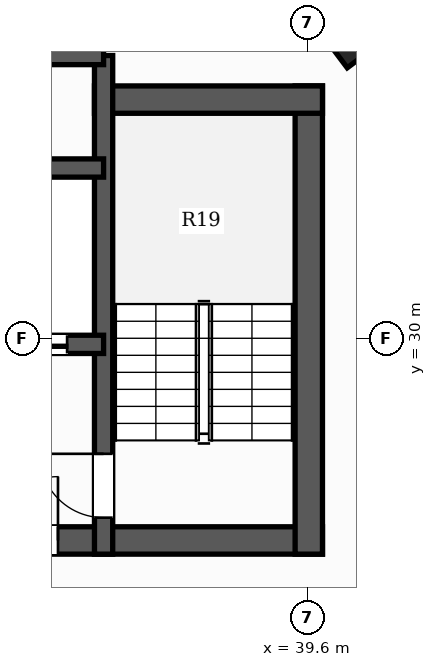
"""IFC4 building model, lengths in metres.
Left out: names, types, materials, properties, quantities, classifications, styles, units other than length and angle.
Written with IfcOpenShell. Run it as: python <this file> out.ifc"""

import sys

from ifc_helpers import new_model, si_unit, direction, frame, frame_2d, origin, origin_2d, place, context, subcontext, project, spatial, rectangle, hollow_rectangle, extrude, element, fill, save


model = new_model("IFC4")
c1 = context("Model", 3, precision=1e-05, world=origin(), true_north=direction((0.0, 1.0)))
c2 = subcontext(c1, "Body", "Model", "MODEL_VIEW")
j1 = project(units=[si_unit("LENGTHUNIT", "METRE"), si_unit("PLANEANGLEUNIT", "RADIAN")], contexts=[c1])
p1 = place(None, origin())
s1 = spatial("IfcSite", under=j1, at=p1, CompositionType="ELEMENT")
p2 = place(p1, origin())
s2 = spatial("IfcBuilding", under=s1, at=p2, CompositionType="ELEMENT")
p3 = place(p2, frame((0.0, 0.0, 23.6)))
s3 = spatial("IfcBuildingStorey", under=s2, at=p3, CompositionType="ELEMENT", Elevation=23.6)
p4 = place(p3, frame((26.15, 26.675, 0.0), z_axis=(0.0, 0.0, 1.0), x_axis=(1.0, 0.0, 0.0)))
e1 = element("IfcWall", 1, at=p4, inside=s3, PredefinedType="SHEAR", context=c2, shape_type="SweptSolid", body=[
    extrude(rectangle(XDim=13.7, YDim=0.45, at=frame_2d((6.85, 0.0))), origin(), (0.0, 0.0, 1.0), 3.3),
])
p5 = place(p4, frame((4.35, 0.0, 0.0)))
e2 = element("IfcOpeningElement", 2, at=p5, cuts=e1, PredefinedType="OPENING", context=c2, shape_type="SweptSolid", body=[
    extrude(rectangle(XDim=1.05, YDim=2.15, at=frame_2d((0.525, 1.075))), frame((0.0, 0.235, 0.0), z_axis=(0.0, -1.0, 0.0), x_axis=(1.0, 0.0, 0.0)), (0.0, 0.0, 1.0), 0.47),
])
p6 = place(p4, frame((8.3, 0.0, 0.0)))
e3 = element("IfcOpeningElement", 3, at=p6, cuts=e1, PredefinedType="OPENING", context=c2, shape_type="SweptSolid", body=[
    extrude(rectangle(XDim=1.05, YDim=2.15, at=frame_2d((0.525, 1.075))), frame((0.0, 0.235, 0.0), z_axis=(0.0, -1.0, 0.0), x_axis=(1.0, 0.0, 0.0)), (0.0, 0.0, 1.0), 0.47),
])
p7 = place(p3, frame((39.625, 26.45, 0.0), z_axis=(0.0, 0.0, 1.0), x_axis=(0.0, 1.0, 0.0)))
e4 = element("IfcWall", 4, at=p7, inside=s3, PredefinedType="SHEAR", context=c2, shape_type="SweptSolid", body=[
    extrude(rectangle(XDim=7.7, YDim=0.45, at=frame_2d((3.85, 0.0))), origin(), (0.0, 0.0, 1.0), 3.3),
])
p8 = place(p3, frame((36.1, 33.925, 0.0), z_axis=(0.0, 0.0, 1.0), x_axis=(1.0, 0.0, 0.0)))
e5 = element("IfcWall", 5, at=p8, inside=s3, PredefinedType="SHEAR", context=c2, shape_type="SweptSolid", body=[
    extrude(rectangle(XDim=3.75, YDim=0.45, at=frame_2d((1.875, 0.0))), origin(), (0.0, 0.0, 1.0), 3.3),
])
p9 = place(p3, frame((36.25, 26.45, 0.0), z_axis=(0.0, 0.0, 1.0), x_axis=(0.0, 1.0, 0.0)))
e6 = element("IfcWall", 6, at=p9, inside=s3, PredefinedType="SHEAR", context=c2, shape_type="SweptSolid", body=[
    extrude(rectangle(XDim=8.2, YDim=0.3, at=frame_2d((4.1, 0.0))), origin(), (0.0, 0.0, 1.0), 3.3),
])
p10 = place(p9, frame((0.6, 0.0, 0.0)))
e7 = element("IfcOpeningElement", 7, at=p10, cuts=e6, PredefinedType="OPENING", context=c2, shape_type="SweptSolid", body=[
    extrude(rectangle(XDim=1.05, YDim=2.15, at=frame_2d((0.525, 1.075))), frame((0.0, 0.16, 0.0), z_axis=(0.0, -1.0, 0.0), x_axis=(1.0, 0.0, 0.0)), (0.0, 0.0, 1.0), 0.32),
])
p11 = place(p3, frame((36.25, 29.9, 0.0), z_axis=(0.0, 0.0, 1.0), x_axis=(-1.0, 0.0, 0.0)))
e8 = element("IfcWall", 8, at=p11, inside=s3, PredefinedType="SHEAR", context=c2, shape_type="SweptSolid", body=[
    extrude(rectangle(XDim=6.5, YDim=0.3, at=frame_2d((3.25, 0.0))), origin(), (0.0, 0.0, 1.0), 3.3),
])
p12 = place(p11, frame((4.875, 0.0, 0.0)))
e9 = element("IfcOpeningElement", 9, at=p12, cuts=e8, PredefinedType="OPENING", context=c2, shape_type="SweptSolid", body=[
    extrude(rectangle(XDim=1.1, YDim=2.2, at=frame_2d((0.55, 1.1))), frame((0.0, 0.16, 0.0), z_axis=(0.0, -1.0, 0.0), x_axis=(1.0, 0.0, 0.0)), (0.0, 0.0, 1.0), 0.32),
])
p13 = place(p11, frame((2.875, 0.0, 0.0)))
e10 = element("IfcOpeningElement", 10, at=p13, cuts=e8, PredefinedType="OPENING", context=c2, shape_type="SweptSolid", body=[
    extrude(rectangle(XDim=1.1, YDim=2.2, at=frame_2d((0.55, 1.1))), frame((0.0, 0.16, 0.0), z_axis=(0.0, -1.0, 0.0), x_axis=(1.0, 0.0, 0.0)), (0.0, 0.0, 1.0), 0.32),
])
p14 = place(p11, frame((0.6, 0.0, 0.0)))
e11 = element("IfcOpeningElement", 11, at=p14, cuts=e8, PredefinedType="OPENING", context=c2, shape_type="SweptSolid", body=[
    extrude(rectangle(XDim=1.3, YDim=2.2, at=frame_2d((0.65, 1.1))), frame((0.0, 0.16, 0.0), z_axis=(0.0, -1.0, 0.0), x_axis=(1.0, 0.0, 0.0)), (0.0, 0.0, 1.0), 0.32),
])
p15 = place(p3, frame((29.75, 32.8, 0.0), z_axis=(0.0, 0.0, 1.0), x_axis=(1.0, 0.0, 0.0)))
e12 = element("IfcWall", 12, at=p15, inside=s3, PredefinedType="SHEAR", context=c2, shape_type="SweptSolid", body=[
    extrude(rectangle(XDim=6.5, YDim=0.3, at=frame_2d((3.25, 0.0))), origin(), (0.0, 0.0, 1.0), 3.3),
])
p16 = place(p3, frame((29.75, 34.65, 0.0), z_axis=(0.0, 0.0, 1.0), x_axis=(1.0, 0.0, 0.0)))
e13 = element("IfcWall", 13, at=p16, inside=s3, PredefinedType="SHEAR", context=c2, shape_type="SweptSolid", body=[
    extrude(rectangle(XDim=6.5, YDim=0.3, at=frame_2d((3.25, 0.0))), origin(), (0.0, 0.0, 1.0), 3.3),
])
p17 = place(p16, frame((2.84, 0.0, 0.0)))
e14 = element("IfcOpeningElement", 14, at=p17, cuts=e13, PredefinedType="OPENING", context=c2, shape_type="SweptSolid", body=[
    extrude(rectangle(XDim=0.82, YDim=2.1, at=frame_2d((0.41, 1.05))), frame((0.0, 0.16, 0.0), z_axis=(0.0, -1.0, 0.0), x_axis=(1.0, 0.0, 0.0)), (0.0, 0.0, 1.0), 0.32),
])
p18 = place(p3, frame((40.352, 35.113, 0.0), z_axis=(0.0, 0.0, 1.0), x_axis=(-0.600420225326, 0.799684658487, 0.0)))
e15 = element("IfcColumn", 15, at=p18, inside=s3, PredefinedType="COLUMN", context=c2, shape_type="SweptSolid", body=[
    extrude(hollow_rectangle(XDim=0.95, YDim=0.95, WallThickness=0.032, at=origin_2d()), origin(), (0.0, 0.0, 1.0), 3.3),
])
p19 = place(p10, origin())
e16 = element("IfcDoor", 16, at=p19, inside=s3, OperationType="SINGLE_SWING_RIGHT", PredefinedType="DOOR", context=c2, shape_type="SweptSolid", body=[
    extrude(rectangle(XDim=1.05, YDim=2.15, at=frame_2d((0.525, 1.075))), frame((0.0, 0.025, 0.0), z_axis=(0.0, -1.0, 0.0), x_axis=(1.0, 0.0, 0.0)), (0.0, 0.0, 1.0), 0.05),
])
fill(e7, e16)
p20 = place(p6, origin())
e17 = element("IfcDoor", 17, at=p20, inside=s3, OperationType="SINGLE_SWING_RIGHT", PredefinedType="DOOR", context=c2, shape_type="SweptSolid", body=[
    extrude(rectangle(XDim=1.05, YDim=2.15, at=frame_2d((0.525, 1.075))), frame((0.0, 0.025, 0.0), z_axis=(0.0, -1.0, 0.0), x_axis=(1.0, 0.0, 0.0)), (0.0, 0.0, 1.0), 0.05),
])
fill(e3, e17)
p21 = place(p14, origin())
e18 = element("IfcDoor", 18, at=p21, inside=s3, OperationType="DOUBLE_DOOR_SLIDING", PredefinedType="DOOR", context=c2, shape_type="SweptSolid", body=[
    extrude(rectangle(XDim=1.3, YDim=2.2, at=frame_2d((0.65, 1.1))), frame((0.0, 0.025, 0.0), z_axis=(0.0, -1.0, 0.0), x_axis=(1.0, 0.0, 0.0)), (0.0, 0.0, 1.0), 0.05),
])
fill(e11, e18)
save(model, sys.argv[1])
